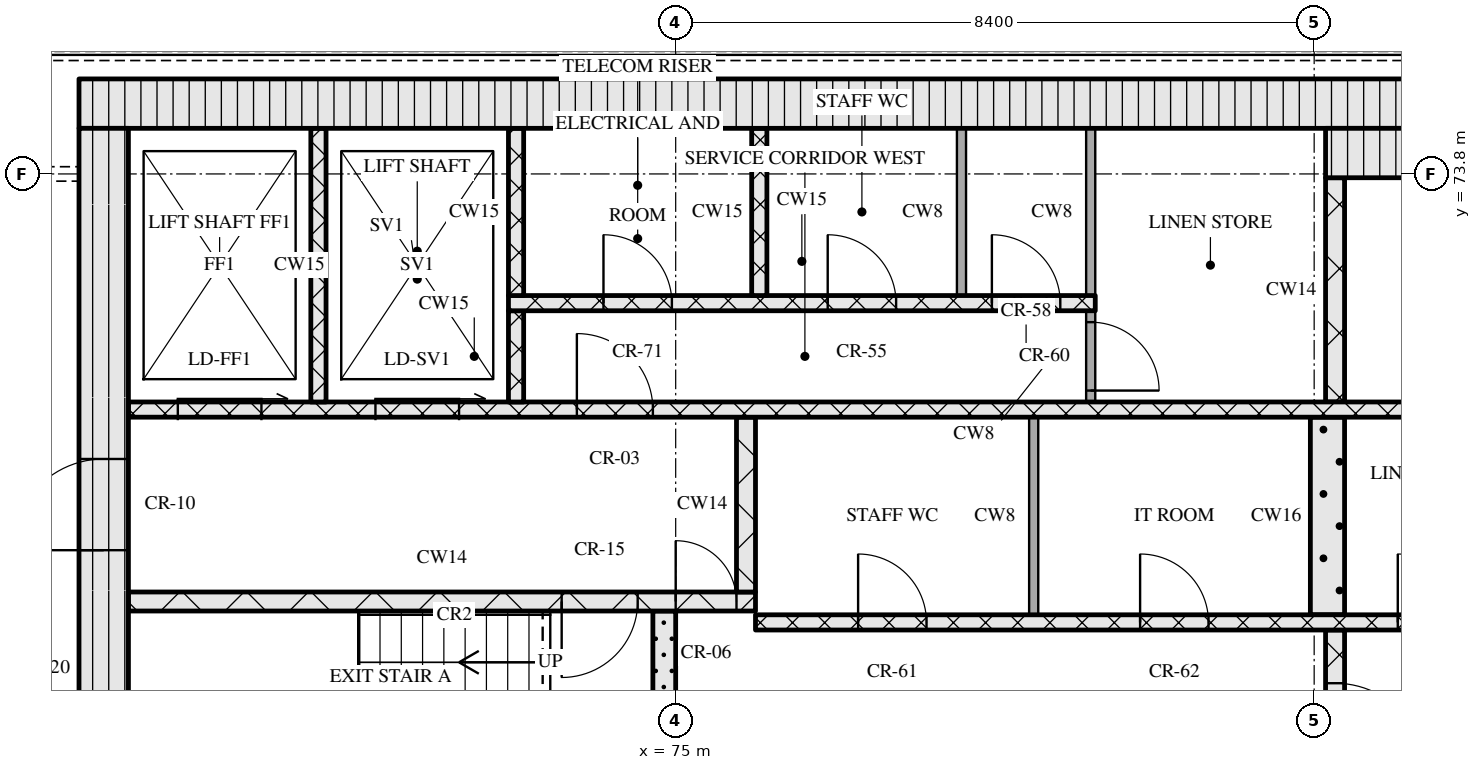
"""IFC4 building model, lengths in metres.
Left out: names, types, materials, properties, quantities, classifications, styles, units other than length and angle.
Written with IfcOpenShell. Run it as: python <this file> out.ifc"""

import sys

from ifc_helpers import new_model, si_unit, direction, frame, frame_2d, origin, place, context, subcontext, project, spatial, rectangle, extrude, element, fill, save


model = new_model("IFC4")
c1 = context("Model", 3, precision=1e-05, world=origin(), true_north=direction((0.0, 1.0)))
c2 = subcontext(c1, "Body", "Model", "MODEL_VIEW")
j1 = project(units=[si_unit("LENGTHUNIT", "METRE"), si_unit("PLANEANGLEUNIT", "RADIAN")], contexts=[c1])
p1 = place(None, origin())
s1 = spatial("IfcSite", under=j1, at=p1, CompositionType="ELEMENT")
p2 = place(p1, origin())
s2 = spatial("IfcBuilding", under=s1, at=p2, CompositionType="ELEMENT")
p3 = place(p2, frame((0.0, 0.0, 227.1)))
s3 = spatial("IfcBuildingStorey", under=s2, at=p3, CompositionType="ELEMENT", Elevation=227.1)
p4 = place(p3, frame((67.15, 74.725, 0.0), z_axis=(0.0, 0.0, 1.0), x_axis=(1.0, 0.0, 0.0)))
e1 = element("IfcWall", 1, at=p4, inside=s3, PredefinedType="SOLIDWALL", context=c2, shape_type="SweptSolid", body=[
    extrude(rectangle(XDim=40.9, YDim=0.65, at=frame_2d((20.45, 0.0))), origin(), (0.0, 0.0, 1.0), 3.32),
])
p5 = place(p3, frame((67.475, 62.4, 0.0), z_axis=(0.0, 0.0, 1.0), x_axis=(0.0, 1.0, 0.0)))
e2 = element("IfcWall", 2, at=p5, inside=s3, PredefinedType="SOLIDWALL", context=c2, shape_type="SweptSolid", body=[
    extrude(rectangle(XDim=12.0, YDim=0.65, at=frame_2d((6.0, 0.0))), origin(), (0.0, 0.0, 1.0), 3.32),
])
p6 = place(p5, frame((6.45, 0.0, 0.0)))
e3 = element("IfcOpeningElement", 3, at=p6, cuts=e2, PredefinedType="OPENING", context=c2, shape_type="SweptSolid", body=[
    extrude(rectangle(XDim=1.2, YDim=2.1, at=frame_2d((0.6, 1.05))), frame((0.0, 0.335, 0.0), z_axis=(0.0, -1.0, 0.0), x_axis=(1.0, 0.0, 0.0)), (0.0, 0.0, 1.0), 0.67),
])
p7 = place(p3, frame((74.85, 65.2, 0.0), z_axis=(0.0, 0.0, 1.0), x_axis=(0.0, 1.0, 0.0)))
e4 = element("IfcWall", 4, at=p7, inside=s3, PredefinedType="SOLIDWALL", context=c2, shape_type="SweptSolid", body=[
    extrude(rectangle(XDim=2.85, YDim=0.3, at=frame_2d((1.425, 0.0))), origin(), (0.0, 0.0, 1.0), 3.32),
])
p8 = place(p3, frame((83.675, 65.2, 0.0), z_axis=(0.0, 0.0, 1.0), x_axis=(0.0, 1.0, 0.0)))
e5 = element("IfcWall", 5, at=p8, inside=s3, PredefinedType="SOLIDWALL", context=c2, shape_type="SweptSolid", body=[
    extrude(rectangle(XDim=2.6, YDim=0.25, at=frame_2d((1.3, 0.0))), origin(), (0.0, 0.0, 1.0), 3.32),
])
p9 = place(p8, frame((0.7, 0.0, 0.0)))
e6 = element("IfcOpeningElement", 6, at=p9, cuts=e5, PredefinedType="OPENING", context=c2, shape_type="SweptSolid", body=[
    extrude(rectangle(XDim=1.2, YDim=2.1, at=frame_2d((0.6, 1.05))), frame((0.0, 0.135, 0.0), z_axis=(0.0, -1.0, 0.0), x_axis=(1.0, 0.0, 0.0)), (0.0, 0.0, 1.0), 0.27),
])
p10 = place(p3, frame((76.05, 67.9, 0.0), z_axis=(0.0, 0.0, 1.0), x_axis=(1.0, 0.0, 0.0)))
e7 = element("IfcWall", 7, at=p10, inside=s3, PredefinedType="SOLIDWALL", context=c2, shape_type="SweptSolid", body=[
    extrude(rectangle(XDim=23.1, YDim=0.2, at=frame_2d((11.55, 0.0))), origin(), (0.0, 0.0, 1.0), 3.32),
])
p11 = place(p10, frame((1.35, 0.0, 0.0)))
e8 = element("IfcOpeningElement", 8, at=p11, cuts=e7, PredefinedType="OPENING", context=c2, shape_type="SweptSolid", body=[
    extrude(rectangle(XDim=0.9, YDim=2.1, at=frame_2d((0.45, 1.05))), frame((0.0, 0.11, 0.0), z_axis=(0.0, -1.0, 0.0), x_axis=(1.0, 0.0, 0.0)), (0.0, 0.0, 1.0), 0.22),
])
p12 = place(p10, frame((5.06, 0.0, 0.0)))
e9 = element("IfcOpeningElement", 9, at=p12, cuts=e7, PredefinedType="OPENING", context=c2, shape_type="SweptSolid", body=[
    extrude(rectangle(XDim=0.9, YDim=2.1, at=frame_2d((0.45, 1.05))), frame((0.0, 0.11, 0.0), z_axis=(0.0, -1.0, 0.0), x_axis=(1.0, 0.0, 0.0)), (0.0, 0.0, 1.0), 0.22),
])
p13 = place(p10, frame((8.45, 0.0, 0.0)))
e10 = element("IfcOpeningElement", 10, at=p13, cuts=e7, PredefinedType="OPENING", context=c2, shape_type="SweptSolid", body=[
    extrude(rectangle(XDim=0.9, YDim=2.1, at=frame_2d((0.45, 1.05))), frame((0.0, 0.11, 0.0), z_axis=(0.0, -1.0, 0.0), x_axis=(1.0, 0.0, 0.0)), (0.0, 0.0, 1.0), 0.22),
])
p14 = place(p10, frame((10.91, 0.0, 0.0)))
e11 = element("IfcOpeningElement", 11, at=p14, cuts=e7, PredefinedType="OPENING", context=c2, shape_type="SweptSolid", body=[
    extrude(rectangle(XDim=0.9, YDim=2.1, at=frame_2d((0.45, 1.05))), frame((0.0, 0.11, 0.0), z_axis=(0.0, -1.0, 0.0), x_axis=(1.0, 0.0, 0.0)), (0.0, 0.0, 1.0), 0.22),
])
p15 = place(p10, frame((13.55, 0.0, 0.0)))
e12 = element("IfcOpeningElement", 12, at=p15, cuts=e7, PredefinedType="OPENING", context=c2, shape_type="SweptSolid", body=[
    extrude(rectangle(XDim=1.0, YDim=2.1, at=frame_2d((0.5, 1.05))), frame((0.0, 0.11, 0.0), z_axis=(0.0, -1.0, 0.0), x_axis=(1.0, 0.0, 0.0)), (0.0, 0.0, 1.0), 0.22),
])
p16 = place(p10, frame((16.2, 0.0, 0.0)))
e13 = element("IfcOpeningElement", 13, at=p16, cuts=e7, PredefinedType="OPENING", context=c2, shape_type="SweptSolid", body=[
    extrude(rectangle(XDim=1.1, YDim=2.1, at=frame_2d((0.55, 1.05))), frame((0.0, 0.11, 0.0), z_axis=(0.0, -1.0, 0.0), x_axis=(1.0, 0.0, 0.0)), (0.0, 0.0, 1.0), 0.22),
])
p17 = place(p10, frame((18.7, 0.0, 0.0)))
e14 = element("IfcOpeningElement", 14, at=p17, cuts=e7, PredefinedType="OPENING", context=c2, shape_type="SweptSolid", body=[
    extrude(rectangle(XDim=1.1, YDim=2.1, at=frame_2d((0.55, 1.05))), frame((0.0, 0.11, 0.0), z_axis=(0.0, -1.0, 0.0), x_axis=(1.0, 0.0, 0.0)), (0.0, 0.0, 1.0), 0.22),
])
p18 = place(p10, frame((21.2, 0.0, 0.0)))
e15 = element("IfcOpeningElement", 15, at=p18, cuts=e7, PredefinedType="OPENING", context=c2, shape_type="SweptSolid", body=[
    extrude(rectangle(XDim=1.1, YDim=2.1, at=frame_2d((0.55, 1.05))), frame((0.0, 0.11, 0.0), z_axis=(0.0, -1.0, 0.0), x_axis=(1.0, 0.0, 0.0)), (0.0, 0.0, 1.0), 0.22),
])
p19 = place(p3, frame((79.71, 68.0, 0.0), z_axis=(0.0, 0.0, 1.0), x_axis=(0.0, 1.0, 0.0)))
e16 = element("IfcWall", 16, at=p19, inside=s3, PredefinedType="PARTITIONING", context=c2, shape_type="SweptSolid", body=[
    extrude(rectangle(XDim=2.6, YDim=0.12, at=frame_2d((1.3, 0.0))), origin(), (0.0, 0.0, 1.0), 3.32),
])
p20 = place(p3, frame((83.575, 68.0, 0.0), z_axis=(0.0, 0.0, 1.0), x_axis=(0.0, 1.0, 0.0)))
e17 = element("IfcWall", 17, at=p20, inside=s3, PredefinedType="SOLIDWALL", context=c2, shape_type="SweptSolid", body=[
    extrude(rectangle(XDim=2.6, YDim=0.45, at=frame_2d((1.3, 0.0))), origin(), (0.0, 0.0, 1.0), 3.32),
])
p21 = place(p3, frame((67.8, 68.175, 0.0), z_axis=(0.0, 0.0, 1.0), x_axis=(1.0, 0.0, 0.0)))
e18 = element("IfcWall", 18, at=p21, inside=s3, PredefinedType="SOLIDWALL", context=c2, shape_type="SweptSolid", body=[
    extrude(rectangle(XDim=8.25, YDim=0.25, at=frame_2d((4.125, 0.0))), origin(), (0.0, 0.0, 1.0), 3.32),
])
p22 = place(p21, frame((5.7, 0.0, 0.0)))
e19 = element("IfcOpeningElement", 19, at=p22, cuts=e18, PredefinedType="OPENING", context=c2, shape_type="SweptSolid", body=[
    extrude(rectangle(XDim=1.0, YDim=2.1, at=frame_2d((0.5, 1.05))), frame((0.0, 0.135, 0.0), z_axis=(0.0, -1.0, 0.0), x_axis=(1.0, 0.0, 0.0)), (0.0, 0.0, 1.0), 0.27),
])
p23 = place(p21, frame((7.2, 0.0, 0.0)))
e20 = element("IfcOpeningElement", 20, at=p23, cuts=e18, PredefinedType="OPENING", context=c2, shape_type="SweptSolid", body=[
    extrude(rectangle(XDim=0.8, YDim=2.1, at=frame_2d((0.4, 1.05))), frame((0.0, 0.135, 0.0), z_axis=(0.0, -1.0, 0.0), x_axis=(1.0, 0.0, 0.0)), (0.0, 0.0, 1.0), 0.27),
])
p24 = place(p3, frame((75.925, 68.3, 0.0), z_axis=(0.0, 0.0, 1.0), x_axis=(0.0, 1.0, 0.0)))
e21 = element("IfcWall", 21, at=p24, inside=s3, PredefinedType="SOLIDWALL", context=c2, shape_type="SweptSolid", body=[
    extrude(rectangle(XDim=2.3, YDim=0.25, at=frame_2d((1.15, 0.0))), origin(), (0.0, 0.0, 1.0), 3.32),
])
p25 = place(p3, frame((67.8, 70.7, 0.0), z_axis=(0.0, 0.0, 1.0), x_axis=(1.0, 0.0, 0.0)))
e22 = element("IfcWall", 22, at=p25, inside=s3, PredefinedType="SOLIDWALL", context=c2, shape_type="SweptSolid", body=[
    extrude(rectangle(XDim=39.6, YDim=0.2, at=frame_2d((19.8, 0.0))), origin(), (0.0, 0.0, 1.0), 3.32),
])
p26 = place(p25, frame((0.65, 0.0, 0.0)))
e23 = element("IfcOpeningElement", 23, at=p26, cuts=e22, PredefinedType="OPENING", context=c2, shape_type="SweptSolid", body=[
    extrude(rectangle(XDim=1.1, YDim=2.1, at=frame_2d((0.55, 1.05))), frame((0.0, 0.11, 0.0), z_axis=(0.0, -1.0, 0.0), x_axis=(1.0, 0.0, 0.0)), (0.0, 0.0, 1.0), 0.22),
])
p27 = place(p25, frame((3.25, 0.0, 0.0)))
e24 = element("IfcOpeningElement", 24, at=p27, cuts=e22, PredefinedType="OPENING", context=c2, shape_type="SweptSolid", body=[
    extrude(rectangle(XDim=1.1, YDim=2.1, at=frame_2d((0.55, 1.05))), frame((0.0, 0.11, 0.0), z_axis=(0.0, -1.0, 0.0), x_axis=(1.0, 0.0, 0.0)), (0.0, 0.0, 1.0), 0.22),
])
p28 = place(p25, frame((5.9, 0.0, 0.0)))
e25 = element("IfcOpeningElement", 25, at=p28, cuts=e22, PredefinedType="OPENING", context=c2, shape_type="SweptSolid", body=[
    extrude(rectangle(XDim=1.0, YDim=2.1, at=frame_2d((0.5, 1.05))), frame((0.0, 0.11, 0.0), z_axis=(0.0, -1.0, 0.0), x_axis=(1.0, 0.0, 0.0)), (0.0, 0.0, 1.0), 0.22),
])
p29 = place(p25, frame((21.7, 0.0, 0.0)))
e26 = element("IfcOpeningElement", 26, at=p29, cuts=e22, PredefinedType="OPENING", context=c2, shape_type="SweptSolid", body=[
    extrude(rectangle(XDim=1.0, YDim=2.1, at=frame_2d((0.5, 1.05))), frame((0.0, 0.11, 0.0), z_axis=(0.0, -1.0, 0.0), x_axis=(1.0, 0.0, 0.0)), (0.0, 0.0, 1.0), 0.22),
])
p30 = place(p25, frame((32.7, 0.0, 0.0)))
e27 = element("IfcOpeningElement", 27, at=p30, cuts=e22, PredefinedType="OPENING", context=c2, shape_type="SweptSolid", body=[
    extrude(rectangle(XDim=1.0, YDim=2.1, at=frame_2d((0.5, 1.05))), frame((0.0, 0.11, 0.0), z_axis=(0.0, -1.0, 0.0), x_axis=(1.0, 0.0, 0.0)), (0.0, 0.0, 1.0), 0.22),
])
p31 = place(p25, frame((35.25, 0.0, 0.0)))
e28 = element("IfcOpeningElement", 28, at=p31, cuts=e22, PredefinedType="OPENING", context=c2, shape_type="SweptSolid", body=[
    extrude(rectangle(XDim=1.1, YDim=2.1, at=frame_2d((0.55, 1.05))), frame((0.0, 0.11, 0.0), z_axis=(0.0, -1.0, 0.0), x_axis=(1.0, 0.0, 0.0)), (0.0, 0.0, 1.0), 0.22),
])
p32 = place(p25, frame((37.85, 0.0, 0.0)))
e29 = element("IfcOpeningElement", 29, at=p32, cuts=e22, PredefinedType="OPENING", context=c2, shape_type="SweptSolid", body=[
    extrude(rectangle(XDim=1.1, YDim=2.1, at=frame_2d((0.55, 1.05))), frame((0.0, 0.11, 0.0), z_axis=(0.0, -1.0, 0.0), x_axis=(1.0, 0.0, 0.0)), (0.0, 0.0, 1.0), 0.22),
])
p33 = place(p3, frame((70.3, 70.8, 0.0), z_axis=(0.0, 0.0, 1.0), x_axis=(0.0, 1.0, 0.0)))
e30 = element("IfcWall", 30, at=p33, inside=s3, PredefinedType="SOLIDWALL", context=c2, shape_type="SweptSolid", body=[
    extrude(rectangle(XDim=3.6, YDim=0.2, at=frame_2d((1.8, 0.0))), origin(), (0.0, 0.0, 1.0), 3.32),
])
p34 = place(p3, frame((72.9, 70.8, 0.0), z_axis=(0.0, 0.0, 1.0), x_axis=(0.0, 1.0, 0.0)))
e31 = element("IfcWall", 31, at=p34, inside=s3, PredefinedType="SOLIDWALL", context=c2, shape_type="SweptSolid", body=[
    extrude(rectangle(XDim=1.2, YDim=0.2, at=frame_2d((0.6, 0.0))), origin(), (0.0, 0.0, 1.0), 3.32),
])
p35 = place(p3, frame((80.46, 70.8, 0.0), z_axis=(0.0, 0.0, 1.0), x_axis=(0.0, 1.0, 0.0)))
e32 = element("IfcWall", 32, at=p35, inside=s3, PredefinedType="PARTITIONING", context=c2, shape_type="SweptSolid", body=[
    extrude(rectangle(XDim=1.2, YDim=0.12, at=frame_2d((0.6, 0.0))), origin(), (0.0, 0.0, 1.0), 3.32),
])
p36 = place(p35, frame((0.15, 0.0, 0.0)))
e33 = element("IfcOpeningElement", 33, at=p36, cuts=e32, PredefinedType="OPENING", context=c2, shape_type="SweptSolid", body=[
    extrude(rectangle(XDim=0.9, YDim=2.1, at=frame_2d((0.45, 1.05))), frame((0.0, 0.07, 0.0), z_axis=(0.0, -1.0, 0.0), x_axis=(1.0, 0.0, 0.0)), (0.0, 0.0, 1.0), 0.14),
])
p37 = place(p3, frame((83.675, 70.8, 0.0), z_axis=(0.0, 0.0, 1.0), x_axis=(0.0, 1.0, 0.0)))
e34 = element("IfcWall", 34, at=p37, inside=s3, PredefinedType="SOLIDWALL", context=c2, shape_type="SweptSolid", body=[
    extrude(rectangle(XDim=2.95, YDim=0.25, at=frame_2d((1.475, 0.0))), origin(), (0.0, 0.0, 1.0), 3.32),
])
p38 = place(p3, frame((72.8, 72.1, 0.0), z_axis=(0.0, 0.0, 1.0), x_axis=(1.0, 0.0, 0.0)))
e35 = element("IfcWall", 35, at=p38, inside=s3, PredefinedType="SOLIDWALL", context=c2, shape_type="SweptSolid", body=[
    extrude(rectangle(XDim=7.72, YDim=0.2, at=frame_2d((3.86, 0.0))), origin(), (0.0, 0.0, 1.0), 3.32),
])
p39 = place(p38, frame((1.25, 0.0, 0.0)))
e36 = element("IfcOpeningElement", 36, at=p39, cuts=e35, PredefinedType="OPENING", context=c2, shape_type="SweptSolid", body=[
    extrude(rectangle(XDim=0.9, YDim=2.1, at=frame_2d((0.45, 1.05))), frame((0.0, 0.11, 0.0), z_axis=(0.0, -1.0, 0.0), x_axis=(1.0, 0.0, 0.0)), (0.0, 0.0, 1.0), 0.22),
])
p40 = place(p38, frame((4.2, 0.0, 0.0)))
e37 = element("IfcOpeningElement", 37, at=p40, cuts=e35, PredefinedType="OPENING", context=c2, shape_type="SweptSolid", body=[
    extrude(rectangle(XDim=0.9, YDim=2.1, at=frame_2d((0.45, 1.05))), frame((0.0, 0.11, 0.0), z_axis=(0.0, -1.0, 0.0), x_axis=(1.0, 0.0, 0.0)), (0.0, 0.0, 1.0), 0.22),
])
p41 = place(p38, frame((6.36, 0.0, 0.0)))
e38 = element("IfcOpeningElement", 38, at=p41, cuts=e35, PredefinedType="OPENING", context=c2, shape_type="SweptSolid", body=[
    extrude(rectangle(XDim=0.9, YDim=2.1, at=frame_2d((0.45, 1.05))), frame((0.0, 0.11, 0.0), z_axis=(0.0, -1.0, 0.0), x_axis=(1.0, 0.0, 0.0)), (0.0, 0.0, 1.0), 0.22),
])
for number, where, z_axis, x_axis in (
    (39, (72.9, 72.2, 0.0), (0.0, 0.0, 1.0), (0.0, 1.0, 0.0)),
    (40, (76.1, 72.2, 0.0), (0.0, 0.0, 1.0), (0.0, 1.0, 0.0)),
):
    element("IfcWall", number, at=place(p3, frame(where, z_axis=z_axis, x_axis=x_axis)), inside=s3, PredefinedType="SOLIDWALL", context=c2, shape_type="SweptSolid", body=[
        extrude(rectangle(XDim=2.2, YDim=0.2, at=frame_2d((1.1, 0.0))), origin(), (0.0, 0.0, 1.0), 3.32),
    ])
for number, where, z_axis, x_axis in (
    (41, (78.76, 72.2, 0.0), (0.0, 0.0, 1.0), (0.0, 1.0, 0.0)),
    (42, (80.46, 72.2, 0.0), (0.0, 0.0, 1.0), (0.0, 1.0, 0.0)),
):
    element("IfcWall", number, at=place(p3, frame(where, z_axis=z_axis, x_axis=x_axis)), inside=s3, PredefinedType="PARTITIONING", context=c2, shape_type="SweptSolid", body=[
        extrude(rectangle(XDim=2.2, YDim=0.12, at=frame_2d((1.1, 0.0))), origin(), (0.0, 0.0, 1.0), 3.32),
    ])
p42 = place(p3, frame((83.55, 74.075, 0.0), z_axis=(0.0, 0.0, 1.0), x_axis=(1.0, 0.0, 0.0)))
e43 = element("IfcWall", 43, at=p42, inside=s3, PredefinedType="SOLIDWALL", context=c2, shape_type="SweptSolid", body=[
    extrude(rectangle(XDim=8.1, YDim=0.65, at=frame_2d((4.05, 0.0))), origin(), (0.0, 0.0, 1.0), 3.32),
])
p43 = place(p9, origin())
e44 = element("IfcDoor", 44, at=p43, inside=s3, OperationType="SINGLE_SWING_RIGHT", PredefinedType="DOOR", context=c2, shape_type="SweptSolid", body=[
    extrude(rectangle(XDim=1.2, YDim=2.1, at=frame_2d((0.6, 1.05))), frame((0.0, 0.025, 0.0), z_axis=(0.0, -1.0, 0.0), x_axis=(1.0, 0.0, 0.0)), (0.0, 0.0, 1.0), 0.05),
])
fill(e6, e44)
p44 = place(p11, origin())
e45 = element("IfcDoor", 45, at=p44, inside=s3, OperationType="SINGLE_SWING_LEFT", PredefinedType="DOOR", context=c2, shape_type="SweptSolid", body=[
    extrude(rectangle(XDim=0.9, YDim=2.1, at=frame_2d((0.45, 1.05))), frame((0.0, 0.025, 0.0), z_axis=(0.0, -1.0, 0.0), x_axis=(1.0, 0.0, 0.0)), (0.0, 0.0, 1.0), 0.05),
])
fill(e8, e45)
p45 = place(p12, origin())
e46 = element("IfcDoor", 46, at=p45, inside=s3, OperationType="SINGLE_SWING_LEFT", PredefinedType="DOOR", context=c2, shape_type="SweptSolid", body=[
    extrude(rectangle(XDim=0.9, YDim=2.1, at=frame_2d((0.45, 1.05))), frame((0.0, 0.025, 0.0), z_axis=(0.0, -1.0, 0.0), x_axis=(1.0, 0.0, 0.0)), (0.0, 0.0, 1.0), 0.05),
])
fill(e9, e46)
p46 = place(p13, origin())
e47 = element("IfcDoor", 47, at=p46, inside=s3, OperationType="SINGLE_SWING_LEFT", PredefinedType="DOOR", context=c2, shape_type="SweptSolid", body=[
    extrude(rectangle(XDim=0.9, YDim=2.1, at=frame_2d((0.45, 1.05))), frame((0.0, 0.025, 0.0), z_axis=(0.0, -1.0, 0.0), x_axis=(1.0, 0.0, 0.0)), (0.0, 0.0, 1.0), 0.05),
])
fill(e10, e47)
p47 = place(p22, origin())
e48 = element("IfcDoor", 48, at=p47, inside=s3, OperationType="SINGLE_SWING_RIGHT", PredefinedType="DOOR", context=c2, shape_type="SweptSolid", body=[
    extrude(rectangle(XDim=1.0, YDim=2.1, at=frame_2d((0.5, 1.05))), frame((0.0, 0.025, 0.0), z_axis=(0.0, -1.0, 0.0), x_axis=(1.0, 0.0, 0.0)), (0.0, 0.0, 1.0), 0.05),
])
fill(e19, e48)
p48 = place(p23, origin())
e49 = element("IfcDoor", 49, at=p48, inside=s3, OperationType="SINGLE_SWING_LEFT", PredefinedType="DOOR", context=c2, shape_type="SweptSolid", body=[
    extrude(rectangle(XDim=0.8, YDim=2.1, at=frame_2d((0.4, 1.05))), frame((0.0, 0.025, 0.0), z_axis=(0.0, -1.0, 0.0), x_axis=(1.0, 0.0, 0.0)), (0.0, 0.0, 1.0), 0.05),
])
fill(e20, e49)
p49 = place(p6, origin())
e50 = element("IfcDoor", 50, at=p49, inside=s3, OperationType="SINGLE_SWING_LEFT", PredefinedType="DOOR", context=c2, shape_type="SweptSolid", body=[
    extrude(rectangle(XDim=1.2, YDim=2.1, at=frame_2d((0.6, 1.05))), frame((0.0, 0.025, 0.0), z_axis=(0.0, -1.0, 0.0), x_axis=(1.0, 0.0, 0.0)), (0.0, 0.0, 1.0), 0.05),
])
fill(e3, e50)
p50 = place(p26, origin())
e51 = element("IfcDoor", 51, at=p50, inside=s3, OperationType="SLIDING_TO_RIGHT", PredefinedType="DOOR", context=c2, shape_type="SweptSolid", body=[
    extrude(rectangle(XDim=1.1, YDim=2.1, at=frame_2d((0.55, 1.05))), frame((0.0, 0.025, 0.0), z_axis=(0.0, -1.0, 0.0), x_axis=(1.0, 0.0, 0.0)), (0.0, 0.0, 1.0), 0.05),
])
fill(e23, e51)
p51 = place(p27, origin())
e52 = element("IfcDoor", 52, at=p51, inside=s3, OperationType="SLIDING_TO_RIGHT", PredefinedType="DOOR", context=c2, shape_type="SweptSolid", body=[
    extrude(rectangle(XDim=1.1, YDim=2.1, at=frame_2d((0.55, 1.05))), frame((0.0, 0.025, 0.0), z_axis=(0.0, -1.0, 0.0), x_axis=(1.0, 0.0, 0.0)), (0.0, 0.0, 1.0), 0.05),
])
fill(e24, e52)
p52 = place(p28, origin())
e53 = element("IfcDoor", 53, at=p52, inside=s3, OperationType="SINGLE_SWING_LEFT", PredefinedType="DOOR", context=c2, shape_type="SweptSolid", body=[
    extrude(rectangle(XDim=1.0, YDim=2.1, at=frame_2d((0.5, 1.05))), frame((0.0, 0.025, 0.0), z_axis=(0.0, -1.0, 0.0), x_axis=(1.0, 0.0, 0.0)), (0.0, 0.0, 1.0), 0.05),
])
fill(e25, e53)
p53 = place(p36, origin())
e54 = element("IfcDoor", 54, at=p53, inside=s3, OperationType="SINGLE_SWING_RIGHT", PredefinedType="DOOR", context=c2, shape_type="SweptSolid", body=[
    extrude(rectangle(XDim=0.9, YDim=2.1, at=frame_2d((0.45, 1.05))), frame((0.0, 0.025, 0.0), z_axis=(0.0, -1.0, 0.0), x_axis=(1.0, 0.0, 0.0)), (0.0, 0.0, 1.0), 0.05),
])
fill(e33, e54)
p54 = place(p39, origin())
e55 = element("IfcDoor", 55, at=p54, inside=s3, OperationType="SINGLE_SWING_LEFT", PredefinedType="DOOR", context=c2, shape_type="SweptSolid", body=[
    extrude(rectangle(XDim=0.9, YDim=2.1, at=frame_2d((0.45, 1.05))), frame((0.0, 0.025, 0.0), z_axis=(0.0, -1.0, 0.0), x_axis=(1.0, 0.0, 0.0)), (0.0, 0.0, 1.0), 0.05),
])
fill(e36, e55)
p55 = place(p40, origin())
e56 = element("IfcDoor", 56, at=p55, inside=s3, OperationType="SINGLE_SWING_LEFT", PredefinedType="DOOR", context=c2, shape_type="SweptSolid", body=[
    extrude(rectangle(XDim=0.9, YDim=2.1, at=frame_2d((0.45, 1.05))), frame((0.0, 0.025, 0.0), z_axis=(0.0, -1.0, 0.0), x_axis=(1.0, 0.0, 0.0)), (0.0, 0.0, 1.0), 0.05),
])
fill(e37, e56)
p56 = place(p41, origin())
e57 = element("IfcDoor", 57, at=p56, inside=s3, OperationType="SINGLE_SWING_LEFT", PredefinedType="DOOR", context=c2, shape_type="SweptSolid", body=[
    extrude(rectangle(XDim=0.9, YDim=2.1, at=frame_2d((0.45, 1.05))), frame((0.0, 0.025, 0.0), z_axis=(0.0, -1.0, 0.0), x_axis=(1.0, 0.0, 0.0)), (0.0, 0.0, 1.0), 0.05),
])
fill(e38, e57)
save(model, sys.argv[1])
